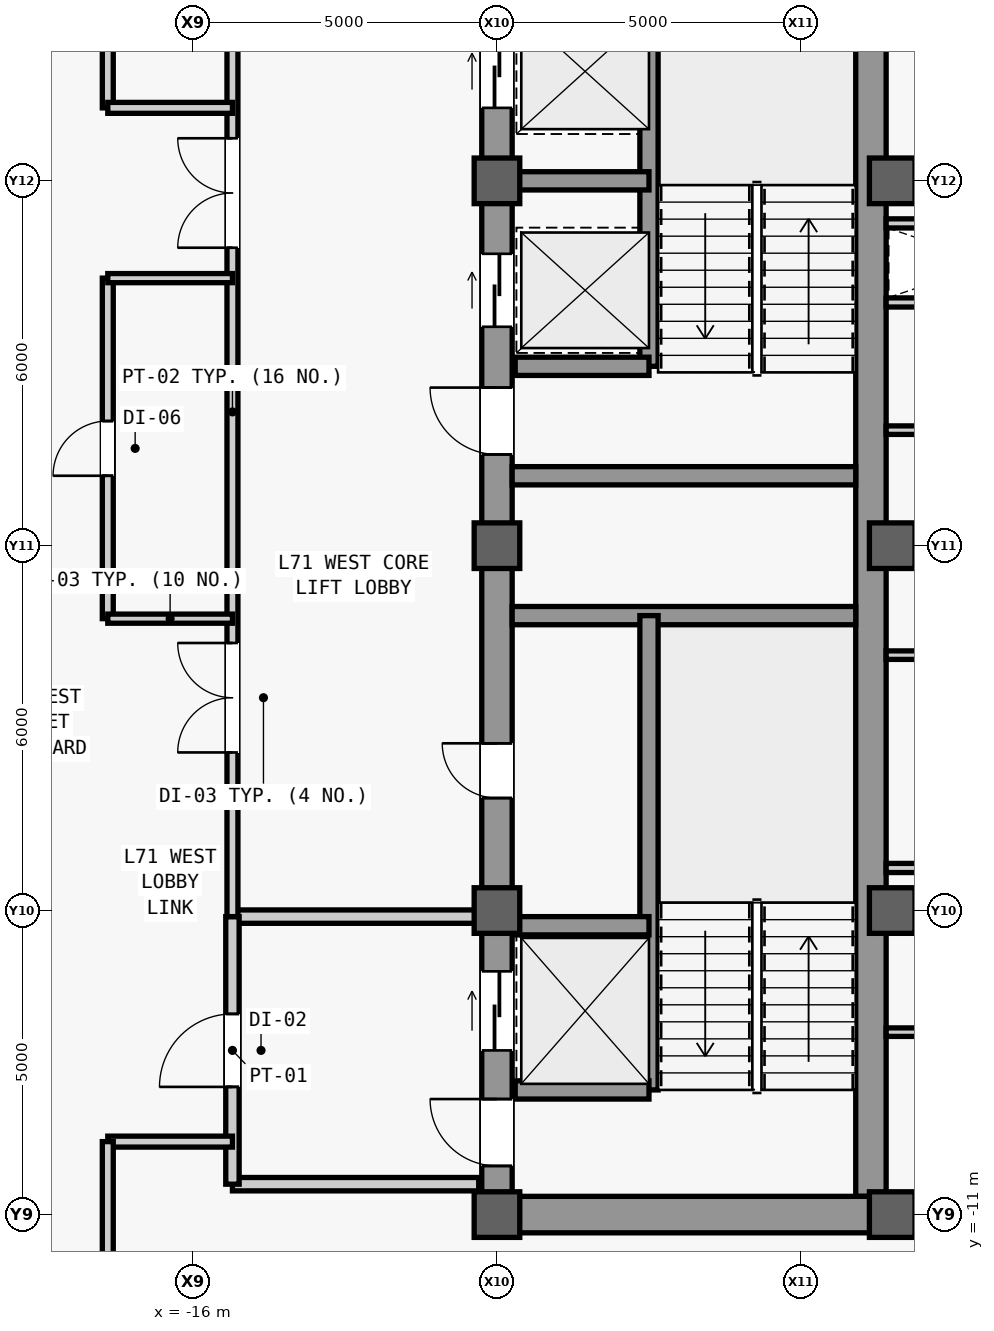
"""IFC4 building model, lengths in metres.
Left out: names, types, materials, properties, quantities, classifications, styles, units other than length and angle.
Written with IfcOpenShell. Run it as: python <this file> out.ifc"""

import sys

from ifc_helpers import new_model, si_unit, direction, frame, frame_2d, origin, origin_2d, place, context, subcontext, project, spatial, rectangle, extrude, source, transform, mapped, element, fill, save


model = new_model("IFC4")
c1 = context("Model", 3, precision=1e-05, world=origin(), true_north=direction((0.0, 1.0)))
c2 = subcontext(c1, "Body", "Model", "MODEL_VIEW")
j1 = project(units=[si_unit("LENGTHUNIT", "METRE"), si_unit("PLANEANGLEUNIT", "RADIAN")], contexts=[c1])
p1 = place(None, origin())
s1 = spatial("IfcSite", under=j1, at=p1, CompositionType="ELEMENT")
p2 = place(p1, origin())
s2 = spatial("IfcBuilding", under=s1, at=p2, CompositionType="ELEMENT")
p3 = place(p2, frame((0.0, 0.0, 301.5)))
s3 = spatial("IfcBuildingStorey", under=s2, at=p3, CompositionType="ELEMENT", Elevation=301.5)
m1 = source(origin(), c2, "Body", "SweptSolid", [
    extrude(rectangle(XDim=22.0, YDim=0.5, at=frame_2d((11.0, 0.0))), origin(), (0.0, 0.0, 1.0), 3.78),
])
p4 = place(p3, frame((-11.0, -11.0, 0.0), z_axis=(0.0, 0.0, 1.0), x_axis=(0.0, 1.0, 0.0)))
e1 = element("IfcWall", 1, at=p4, inside=s3, PredefinedType="SHEAR", context=c2, shape_type="MappedRepresentation", body=[
    mapped(m1, transform((0.0, 0.0, 0.0), scale=1.0)),
])
m2 = source(origin(), c2, "Body", "SweptSolid", [
    extrude(rectangle(XDim=1.1, YDim=2.2, at=frame_2d((0.55, 1.1))), frame((0.0, 0.26, 0.0), z_axis=(0.0, -1.0, 0.0), x_axis=(1.0, 0.0, 0.0)), (0.0, 0.0, 1.0), 0.52),
])
p5 = place(p4, frame((0.8, 0.0, 0.0)))
e2 = element("IfcOpeningElement", 2, at=p5, cuts=e1, PredefinedType="OPENING", context=c2, shape_type="MappedRepresentation", body=[
    mapped(m2, transform((0.0, 0.0, 0.0), scale=1.0)),
])
p6 = place(p4, frame((12.5, 0.0, 0.0)))
e3 = element("IfcOpeningElement", 3, at=p6, cuts=e1, PredefinedType="OPENING", context=c2, shape_type="MappedRepresentation", body=[
    mapped(m2, transform((0.0, 0.0, 0.0), scale=1.0)),
])
m3 = source(origin(), c2, "Body", "SweptSolid", [
    extrude(rectangle(XDim=0.9, YDim=2.15, at=frame_2d((0.45, 1.075))), frame((0.0, 0.26, 0.0), z_axis=(0.0, -1.0, 0.0), x_axis=(1.0, 0.0, 0.0)), (0.0, 0.0, 1.0), 0.52),
])
p7 = place(p4, frame((6.85, 0.0, 0.0)))
e4 = element("IfcOpeningElement", 4, at=p7, cuts=e1, PredefinedType="OPENING", context=c2, shape_type="MappedRepresentation", body=[
    mapped(m3, transform((0.0, 0.0, 0.0), scale=1.0)),
])
m4 = source(origin(), c2, "Body", "SweptSolid", [
    extrude(rectangle(XDim=1.2, YDim=2.3, at=frame_2d((0.6, 1.15))), frame((0.0, 0.26, 0.0), z_axis=(0.0, -1.0, 0.0), x_axis=(1.0, 0.0, 0.0)), (0.0, 0.0, 1.0), 0.52),
])
p8 = place(p4, frame((14.6, 0.0, 0.0)))
e5 = element("IfcOpeningElement", 5, at=p8, cuts=e1, PredefinedType="OPENING", context=c2, shape_type="MappedRepresentation", body=[
    mapped(m4, transform((0.0, 0.0, 0.0), scale=1.0)),
])
p9 = place(p4, frame((18.2, 0.0, 0.0)))
e6 = element("IfcOpeningElement", 6, at=p9, cuts=e1, PredefinedType="OPENING", context=c2, shape_type="MappedRepresentation", body=[
    mapped(m4, transform((0.0, 0.0, 0.0), scale=1.0)),
])
m5 = source(origin(), c2, "Body", "SweptSolid", [
    extrude(rectangle(XDim=1.3, YDim=2.3, at=frame_2d((0.65, 1.15))), frame((0.0, 0.26, 0.0), z_axis=(0.0, -1.0, 0.0), x_axis=(1.0, 0.0, 0.0)), (0.0, 0.0, 1.0), 0.52),
])
p10 = place(p4, frame((2.7, 0.0, 0.0)))
e7 = element("IfcOpeningElement", 7, at=p10, cuts=e1, PredefinedType="OPENING", context=c2, shape_type="MappedRepresentation", body=[
    mapped(m5, transform((0.0, 0.0, 0.0), scale=1.0)),
])
m6 = source(origin(), c2, "Body", "SweptSolid", [
    extrude(rectangle(XDim=21.4, YDim=0.5, at=frame_2d((10.7, 0.0))), origin(), (0.0, 0.0, 1.0), 3.78),
])
p11 = place(p3, frame((-4.85, -10.7, 0.0), z_axis=(0.0, 0.0, 1.0), x_axis=(0.0, 1.0, 0.0)))
e8 = element("IfcWall", 8, at=p11, inside=s3, PredefinedType="SHEAR", context=c2, shape_type="MappedRepresentation", body=[
    mapped(m6, transform((0.0, 0.0, 0.0), scale=1.0)),
])
m7 = source(origin(), c2, "Body", "SweptSolid", [
    extrude(rectangle(XDim=5.9, YDim=0.6, at=frame_2d((2.95, 0.0))), origin(), (0.0, 0.0, 1.0), 3.78),
])
p12 = place(p3, frame((-10.75, -11.0, 0.0), z_axis=(0.0, 0.0, 1.0), x_axis=(1.0, 0.0, 0.0)))
e9 = element("IfcWall", 9, at=p12, inside=s3, PredefinedType="SHEAR", context=c2, shape_type="MappedRepresentation", body=[
    mapped(m7, transform((0.0, 0.0, 0.0), scale=1.0)),
])
m8 = source(origin(), c2, "Body", "SweptSolid", [
    extrude(rectangle(XDim=5.65, YDim=0.3, at=frame_2d((2.825, 0.0))), origin(), (0.0, 0.0, 1.0), 3.78),
])
for number, where, z_axis, x_axis in (
    (10, (-10.75, -1.15, 0.0), (0.0, 0.0, 1.0), (1.0, 0.0, 0.0)),
    (11, (-10.75, 1.15, 0.0), (0.0, 0.0, 1.0), (1.0, 0.0, 0.0)),
):
    element("IfcWall", number, at=place(p3, frame(where, z_axis=z_axis, x_axis=x_axis)), inside=s3, PredefinedType="SHEAR", context=c2, shape_type="MappedRepresentation", body=[
        mapped(m8, transform((0.0, 0.0, 0.0), scale=1.0)),
    ])
m9 = source(origin(), c2, "Body", "SweptSolid", [
    extrude(rectangle(XDim=9.2, YDim=0.5, at=frame_2d((4.6, 0.0))), origin(), (0.0, 0.0, 1.0), 3.78),
])
p13 = place(p3, frame((-4.6, -11.0, 0.0), z_axis=(0.0, 0.0, 1.0), x_axis=(1.0, 0.0, 0.0)))
e12 = element("IfcWall", 12, at=p13, inside=s3, PredefinedType="SHEAR", context=c2, shape_type="MappedRepresentation", body=[
    mapped(m9, transform((0.0, 0.0, 0.0), scale=1.0)),
])
m10 = source(origin(), c2, "Body", "SweptSolid", [
    extrude(rectangle(XDim=1.8, YDim=2.25, at=frame_2d((0.9, 1.125))), frame((0.0, 0.26, 0.0), z_axis=(0.0, -1.0, 0.0), x_axis=(1.0, 0.0, 0.0)), (0.0, 0.0, 1.0), 0.52),
])
p14 = place(p13, frame((3.7, 0.0, 0.0)))
e13 = element("IfcOpeningElement", 13, at=p14, cuts=e12, PredefinedType="OPENING", context=c2, shape_type="MappedRepresentation", body=[
    mapped(m10, transform((0.0, 0.0, 0.0), scale=1.0)),
])
m11 = source(origin(), c2, "Body", "SweptSolid", [
    extrude(rectangle(XDim=0.75, YDim=0.75, at=origin_2d()), origin(), (0.0, 0.0, 1.0), 4.0),
])
for number, where, z_axis, x_axis in (
    (14, (-11.0, -11.0, 0.0), (0.0, 0.0, 1.0), (1.0, 0.0, 0.0)),
    (15, (-11.0, -6.0, 0.0), (0.0, 0.0, 1.0), (1.0, 0.0, 0.0)),
    (16, (-11.0, 0.0, 0.0), (0.0, 0.0, 1.0), (1.0, 0.0, 0.0)),
    (17, (-11.0, 6.0, 0.0), (0.0, 0.0, 1.0), (1.0, 0.0, 0.0)),
    (18, (-4.5, -11.0, 0.0), (0.0, 0.0, 1.0), (1.0, 0.0, 0.0)),
    (19, (-4.5, -6.0, 0.0), (0.0, 0.0, 1.0), (1.0, 0.0, 0.0)),
    (20, (-4.5, 0.0, 0.0), (0.0, 0.0, 1.0), (1.0, 0.0, 0.0)),
    (21, (-4.5, 6.0, 0.0), (0.0, 0.0, 1.0), (1.0, 0.0, 0.0)),
):
    element("IfcColumn", number, at=place(p3, frame(where, z_axis=z_axis, x_axis=x_axis)), inside=s3, PredefinedType="COLUMN", context=c2, shape_type="MappedRepresentation", body=[
        mapped(m11, transform((0.0, 0.0, 0.0), scale=1.0)),
    ])
m12 = source(origin(), c2, "Body", "SweptSolid", [
    extrude(rectangle(XDim=7.8, YDim=0.3, at=frame_2d((3.9, 0.0))), origin(), (0.0, 0.0, 1.0), 3.78),
])
p15 = place(p3, frame((-8.5, -8.95, 0.0), z_axis=(0.0, 0.0, 1.0), x_axis=(0.0, 1.0, 0.0)))
e22 = element("IfcWall", 22, at=p15, inside=s3, PredefinedType="SHEAR", context=c2, shape_type="MappedRepresentation", body=[
    mapped(m12, transform((0.0, 0.0, 0.0), scale=1.0)),
])
m13 = source(origin(), c2, "Body", "SweptSolid", [
    extrude(rectangle(XDim=2.2, YDim=0.3, at=frame_2d((1.1, 0.0))), origin(), (0.0, 0.0, 1.0), 3.78),
])
for number, where, z_axis, x_axis in (
    (23, (-10.7, -8.95, 0.0), (0.0, 0.0, 1.0), (1.0, 0.0, 0.0)),
    (24, (-10.7, -6.25, 0.0), (0.0, 0.0, 1.0), (1.0, 0.0, 0.0)),
):
    element("IfcWall", number, at=place(p3, frame(where, z_axis=z_axis, x_axis=x_axis)), inside=s3, PredefinedType="SHEAR", context=c2, shape_type="MappedRepresentation", body=[
        mapped(m13, transform((0.0, 0.0, 0.0), scale=1.0)),
    ])
m14 = source(origin(), c2, "Body", "SweptSolid", [
    extrude(rectangle(XDim=7.75, YDim=0.3, at=frame_2d((3.875, 0.0))), origin(), (0.0, 0.0, 1.0), 3.78),
])
p16 = place(p3, frame((-8.5, 2.95, 0.0), z_axis=(0.0, 0.0, 1.0), x_axis=(0.0, 1.0, 0.0)))
e25 = element("IfcWall", 25, at=p16, inside=s3, PredefinedType="SHEAR", context=c2, shape_type="MappedRepresentation", body=[
    mapped(m14, transform((0.0, 0.0, 0.0), scale=1.0)),
])
for number, where, z_axis, x_axis in (
    (26, (-10.7, 2.95, 0.0), (0.0, 0.0, 1.0), (1.0, 0.0, 0.0)),
    (27, (-10.7, 6.0, 0.0), (0.0, 0.0, 1.0), (1.0, 0.0, 0.0)),
):
    element("IfcWall", number, at=place(p3, frame(where, z_axis=z_axis, x_axis=x_axis)), inside=s3, PredefinedType="SHEAR", context=c2, shape_type="MappedRepresentation", body=[
        mapped(m13, transform((0.0, 0.0, 0.0), scale=1.0)),
    ])
m15 = source(origin(), c2, "Body", "SweptSolid", [
    extrude(rectangle(XDim=4.05, YDim=0.22, at=frame_2d((2.025, 0.0))), origin(), (0.0, 0.0, 1.0), 3.78),
])
p17 = place(p3, frame((-15.35, -10.5, 0.0), z_axis=(0.0, 0.0, 1.0), x_axis=(1.0, 0.0, 0.0)))
e28 = element("IfcWall", 28, at=p17, inside=s3, PredefinedType="PARTITIONING", context=c2, shape_type="MappedRepresentation", body=[
    mapped(m15, transform((0.0, 0.0, 0.0), scale=1.0)),
])
m16 = source(origin(), c2, "Body", "SweptSolid", [
    extrude(rectangle(XDim=4.05, YDim=0.22, at=frame_2d((2.025, 0.0))), origin(), (0.0, 0.0, 1.0), 3.085),
])
p18 = place(p3, frame((-15.35, -6.1, 0.0), z_axis=(0.0, 0.0, 1.0), x_axis=(1.0, 0.0, 0.0)))
e29 = element("IfcWall", 29, at=p18, inside=s3, PredefinedType="PARTITIONING", context=c2, shape_type="MappedRepresentation", body=[
    mapped(m16, transform((0.0, 0.0, 0.0), scale=1.0)),
])
m17 = source(origin(), c2, "Body", "SweptSolid", [
    extrude(rectangle(XDim=4.4, YDim=0.22, at=frame_2d((2.2, 0.0))), origin(), (0.0, 0.0, 1.0), 3.78),
])
p19 = place(p3, frame((-15.35, -10.5, 0.0), z_axis=(0.0, 0.0, 1.0), x_axis=(0.0, 1.0, 0.0)))
e30 = element("IfcWall", 30, at=p19, inside=s3, PredefinedType="PARTITIONING", context=c2, shape_type="MappedRepresentation", body=[
    mapped(m17, transform((0.0, 0.0, 0.0), scale=1.0)),
])
m18 = source(origin(), c2, "Body", "SweptSolid", [
    extrude(rectangle(XDim=1.2, YDim=2.2, at=frame_2d((0.6, 1.1))), frame((0.0, 0.12, 0.0), z_axis=(0.0, -1.0, 0.0), x_axis=(1.0, 0.0, 0.0)), (0.0, 0.0, 1.0), 0.24),
])
p20 = place(p19, frame((1.6, 0.0, 0.0)))
e31 = element("IfcOpeningElement", 31, at=p20, cuts=e30, PredefinedType="OPENING", context=c2, shape_type="MappedRepresentation", body=[
    mapped(m18, transform((0.0, 0.0, 0.0), scale=1.0)),
])
m19 = source(origin(), c2, "Body", "SweptSolid", [
    extrude(rectangle(XDim=16.6, YDim=0.18, at=frame_2d((8.3, 0.0))), origin(), (0.0, 0.0, 1.0), 3.78),
])
p21 = place(p3, frame((-15.35, -6.1, 0.0), z_axis=(0.0, 0.0, 1.0), x_axis=(0.0, 1.0, 0.0)))
e32 = element("IfcWall", 32, at=p21, inside=s3, PredefinedType="PARTITIONING", context=c2, shape_type="MappedRepresentation", body=[
    mapped(m19, transform((0.0, 0.0, 0.0), scale=1.0)),
])
m20 = source(origin(), c2, "Body", "SweptSolid", [
    extrude(rectangle(XDim=1.8, YDim=2.25, at=frame_2d((0.9, 1.125))), frame((0.0, 0.1, 0.0), z_axis=(0.0, -1.0, 0.0), x_axis=(1.0, 0.0, 0.0)), (0.0, 0.0, 1.0), 0.2),
])
p22 = place(p21, frame((2.7, 0.0, 0.0)))
e33 = element("IfcOpeningElement", 33, at=p22, cuts=e32, PredefinedType="OPENING", context=c2, shape_type="MappedRepresentation", body=[
    mapped(m20, transform((0.0, 0.0, 0.0), scale=1.0)),
])
p23 = place(p21, frame((11.0, 0.0, 0.0)))
e34 = element("IfcOpeningElement", 34, at=p23, cuts=e32, PredefinedType="OPENING", context=c2, shape_type="MappedRepresentation", body=[
    mapped(m20, transform((0.0, 0.0, 0.0), scale=1.0)),
])
m21 = source(origin(), c2, "Body", "SweptSolid", [
    extrude(rectangle(XDim=3.45, YDim=0.15, at=frame_2d((1.725, 0.0))), origin(), (0.0, 0.0, 1.0), 3.78),
])
p24 = place(p3, frame((-4.6, 4.0, 0.0), z_axis=(0.0, 0.0, 1.0), x_axis=(1.0, 0.0, 0.0)))
e35 = element("IfcWall", 35, at=p24, inside=s3, PredefinedType="PARTITIONING", context=c2, shape_type="MappedRepresentation", body=[
    mapped(m21, transform((0.0, 0.0, 0.0), scale=1.0)),
])
m22 = source(origin(), c2, "Body", "SweptSolid", [
    extrude(rectangle(XDim=3.45, YDim=0.14, at=frame_2d((1.725, 0.0))), origin(), (0.0, 0.0, 1.0), 3.78),
])
p25 = place(p3, frame((-4.6, -8.0, 0.0), z_axis=(0.0, 0.0, 1.0), x_axis=(1.0, 0.0, 0.0)))
e36 = element("IfcWall", 36, at=p25, inside=s3, PredefinedType="PARTITIONING", context=c2, shape_type="MappedRepresentation", body=[
    mapped(m22, transform((0.0, 0.0, 0.0), scale=1.0)),
])
for number, where, z_axis, x_axis in (
    (37, (-4.6, -5.3, 0.0), (0.0, 0.0, 1.0), (1.0, 0.0, 0.0)),
    (38, (-4.6, 5.3, 0.0), (0.0, 0.0, 1.0), (1.0, 0.0, 0.0)),
):
    element("IfcWall", number, at=place(p3, frame(where, z_axis=z_axis, x_axis=x_axis)), inside=s3, PredefinedType="PARTITIONING", context=c2, shape_type="MappedRepresentation", body=[
        mapped(m21, transform((0.0, 0.0, 0.0), scale=1.0)),
    ])
for number, where, z_axis, x_axis in (
    (39, (-4.6, -1.8, 0.0), (0.0, 0.0, 1.0), (1.0, 0.0, 0.0)),
    (40, (-4.6, 1.9, 0.0), (0.0, 0.0, 1.0), (1.0, 0.0, 0.0)),
):
    element("IfcWall", number, at=place(p3, frame(where, z_axis=z_axis, x_axis=x_axis)), inside=s3, PredefinedType="PARTITIONING", context=c2, shape_type="MappedRepresentation", body=[
        mapped(m22, transform((0.0, 0.0, 0.0), scale=1.0)),
    ])
m23 = source(origin(), c2, "Body", "SweptSolid", [
    extrude(rectangle(XDim=5.6, YDim=0.18, at=frame_2d((2.8, 0.0))), origin(), (0.0, 0.0, 1.0), 3.78),
])
p26 = place(p3, frame((-17.4, -1.2, 0.0), z_axis=(0.0, 0.0, 1.0), x_axis=(0.0, 1.0, 0.0)))
e41 = element("IfcWall", 41, at=p26, inside=s3, PredefinedType="PARTITIONING", context=c2, shape_type="MappedRepresentation", body=[
    mapped(m23, transform((0.0, 0.0, 0.0), scale=1.0)),
])
m24 = source(origin(), c2, "Body", "SweptSolid", [
    extrude(rectangle(XDim=0.9, YDim=2.15, at=frame_2d((0.45, 1.075))), frame((0.0, 0.1, 0.0), z_axis=(0.0, -1.0, 0.0), x_axis=(1.0, 0.0, 0.0)), (0.0, 0.0, 1.0), 0.2),
])
p27 = place(p26, frame((2.35, 0.0, 0.0)))
e42 = element("IfcOpeningElement", 42, at=p27, cuts=e41, PredefinedType="OPENING", context=c2, shape_type="MappedRepresentation", body=[
    mapped(m24, transform((0.0, 0.0, 0.0), scale=1.0)),
])
m25 = source(origin(), c2, "Body", "SweptSolid", [
    extrude(rectangle(XDim=2.05, YDim=0.15, at=frame_2d((1.025, 0.0))), origin(), (0.0, 0.0, 1.0), 3.78),
])
for number, where, z_axis, x_axis in (
    (43, (-17.4, -1.2, 0.0), (0.0, 0.0, 1.0), (1.0, 0.0, 0.0)),
    (44, (-17.4, 4.4, 0.0), (0.0, 0.0, 1.0), (1.0, 0.0, 0.0)),
):
    element("IfcWall", number, at=place(p3, frame(where, z_axis=z_axis, x_axis=x_axis)), inside=s3, PredefinedType="PARTITIONING", context=c2, shape_type="MappedRepresentation", body=[
        mapped(m25, transform((0.0, 0.0, 0.0), scale=1.0)),
    ])
m26 = source(origin(), c2, "Body", "SweptSolid", [
    extrude(rectangle(XDim=2.05, YDim=0.18, at=frame_2d((1.025, 0.0))), origin(), (0.0, 0.0, 1.0), 3.78),
])
p28 = place(p3, frame((-17.4, -9.8, 0.0), z_axis=(0.0, 0.0, 1.0), x_axis=(1.0, 0.0, 0.0)))
e45 = element("IfcWall", 45, at=p28, inside=s3, PredefinedType="PARTITIONING", context=c2, shape_type="MappedRepresentation", body=[
    mapped(m26, transform((0.0, 0.0, 0.0), scale=1.0)),
])
m27 = source(origin(), c2, "Body", "SweptSolid", [
    extrude(rectangle(XDim=8.4, YDim=0.18, at=frame_2d((4.2, 0.0))), origin(), (0.0, 0.0, 1.0), 3.78),
])
p29 = place(p3, frame((-17.4, 7.2, 0.0), z_axis=(0.0, 0.0, 1.0), x_axis=(0.0, 1.0, 0.0)))
e46 = element("IfcWall", 46, at=p29, inside=s3, PredefinedType="PARTITIONING", context=c2, shape_type="MappedRepresentation", body=[
    mapped(m27, transform((0.0, 0.0, 0.0), scale=1.0)),
])
p30 = place(p3, frame((-17.4, 7.2, 0.0), z_axis=(0.0, 0.0, 1.0), x_axis=(1.0, 0.0, 0.0)))
e47 = element("IfcWall", 47, at=p30, inside=s3, PredefinedType="PARTITIONING", context=c2, shape_type="MappedRepresentation", body=[
    mapped(m26, transform((0.0, 0.0, 0.0), scale=1.0)),
])
m28 = source(origin(), c2, "Body", "SweptSolid", [
    extrude(rectangle(XDim=5.1, YDim=0.18, at=frame_2d((2.55, 0.0))), origin(), (0.0, 0.0, 1.0), 3.78),
])
p31 = place(p3, frame((-17.4, -14.9, 0.0), z_axis=(0.0, 0.0, 1.0), x_axis=(0.0, 1.0, 0.0)))
e48 = element("IfcWall", 48, at=p31, inside=s3, PredefinedType="PARTITIONING", context=c2, shape_type="MappedRepresentation", body=[
    mapped(m28, transform((0.0, 0.0, 0.0), scale=1.0)),
])
m29 = source(origin(), c2, "Body", "SweptSolid", [
    extrude(rectangle(XDim=1.1, YDim=2.2, at=frame_2d((0.55, 1.1))), frame((0.0, 0.025, 0.0), z_axis=(0.0, -1.0, 0.0), x_axis=(1.0, 0.0, 0.0)), (0.0, 0.0, 1.0), 0.05),
])
p32 = place(p5, origin())
e49 = element("IfcDoor", 49, at=p32, inside=s3, OperationType="SINGLE_SWING_RIGHT", PredefinedType="DOOR", context=c2, shape_type="MappedRepresentation", body=[
    mapped(m29, transform((0.0, 0.0, 0.0), scale=1.0)),
])
fill(e2, e49)
p33 = place(p6, origin())
e50 = element("IfcDoor", 50, at=p33, inside=s3, OperationType="SINGLE_SWING_RIGHT", PredefinedType="DOOR", context=c2, shape_type="MappedRepresentation", body=[
    mapped(m29, transform((0.0, 0.0, 0.0), scale=1.0)),
])
fill(e3, e50)
m30 = source(origin(), c2, "Body", "SweptSolid", [
    extrude(rectangle(XDim=0.9, YDim=2.15, at=frame_2d((0.45, 1.075))), frame((0.0, 0.025, 0.0), z_axis=(0.0, -1.0, 0.0), x_axis=(1.0, 0.0, 0.0)), (0.0, 0.0, 1.0), 0.05),
])
p34 = place(p7, origin())
e51 = element("IfcDoor", 51, at=p34, inside=s3, OperationType="SINGLE_SWING_RIGHT", PredefinedType="DOOR", context=c2, shape_type="MappedRepresentation", body=[
    mapped(m30, transform((0.0, 0.0, 0.0), scale=1.0)),
])
fill(e4, e51)
m31 = source(origin(), c2, "Body", "SweptSolid", [
    extrude(rectangle(XDim=1.2, YDim=2.2, at=frame_2d((0.6, 1.1))), frame((0.0, 0.025, 0.0), z_axis=(0.0, -1.0, 0.0), x_axis=(1.0, 0.0, 0.0)), (0.0, 0.0, 1.0), 0.05),
])
p35 = place(p20, origin())
e52 = element("IfcDoor", 52, at=p35, inside=s3, OperationType="SINGLE_SWING_LEFT", PredefinedType="DOOR", context=c2, shape_type="MappedRepresentation", body=[
    mapped(m31, transform((0.0, 0.0, 0.0), scale=1.0)),
])
fill(e31, e52)
m32 = source(origin(), c2, "Body", "SweptSolid", [
    extrude(rectangle(XDim=1.8, YDim=2.25, at=frame_2d((0.9, 1.125))), frame((0.0, 0.025, 0.0), z_axis=(0.0, -1.0, 0.0), x_axis=(1.0, 0.0, 0.0)), (0.0, 0.0, 1.0), 0.05),
])
p36 = place(p22, origin())
e53 = element("IfcDoor", 53, at=p36, inside=s3, OperationType="SINGLE_SWING_LEFT", PredefinedType="DOOR", context=c2, shape_type="MappedRepresentation", body=[
    mapped(m32, transform((0.0, 0.0, 0.0), scale=1.0)),
])
fill(e33, e53)
p37 = place(p23, origin())
e54 = element("IfcDoor", 54, at=p37, inside=s3, OperationType="SINGLE_SWING_RIGHT", PredefinedType="DOOR", context=c2, shape_type="MappedRepresentation", body=[
    mapped(m32, transform((0.0, 0.0, 0.0), scale=1.0)),
])
fill(e34, e54)
p38 = place(p27, origin())
e55 = element("IfcDoor", 55, at=p38, inside=s3, OperationType="SINGLE_SWING_LEFT", PredefinedType="DOOR", context=c2, shape_type="MappedRepresentation", body=[
    mapped(m30, transform((0.0, 0.0, 0.0), scale=1.0)),
])
fill(e42, e55)
m33 = source(origin(), c2, "Body", "SweptSolid", [
    extrude(rectangle(XDim=1.2, YDim=2.3, at=frame_2d((0.6, 1.15))), frame((0.0, 0.025, 0.0), z_axis=(0.0, -1.0, 0.0), x_axis=(1.0, 0.0, 0.0)), (0.0, 0.0, 1.0), 0.05),
])
p39 = place(p8, origin())
e56 = element("IfcDoor", 56, at=p39, inside=s3, OperationType="SLIDING_TO_LEFT", PredefinedType="DOOR", context=c2, shape_type="MappedRepresentation", body=[
    mapped(m33, transform((0.0, 0.0, 0.0), scale=1.0)),
])
fill(e5, e56)
p40 = place(p9, origin())
e57 = element("IfcDoor", 57, at=p40, inside=s3, OperationType="SLIDING_TO_LEFT", PredefinedType="DOOR", context=c2, shape_type="MappedRepresentation", body=[
    mapped(m33, transform((0.0, 0.0, 0.0), scale=1.0)),
])
fill(e6, e57)
m34 = source(origin(), c2, "Body", "SweptSolid", [
    extrude(rectangle(XDim=1.3, YDim=2.3, at=frame_2d((0.65, 1.15))), frame((0.0, 0.025, 0.0), z_axis=(0.0, -1.0, 0.0), x_axis=(1.0, 0.0, 0.0)), (0.0, 0.0, 1.0), 0.05),
])
p41 = place(p10, origin())
e58 = element("IfcDoor", 58, at=p41, inside=s3, OperationType="SLIDING_TO_LEFT", PredefinedType="DOOR", context=c2, shape_type="MappedRepresentation", body=[
    mapped(m34, transform((0.0, 0.0, 0.0), scale=1.0)),
])
fill(e7, e58)
save(model, sys.argv[1])
